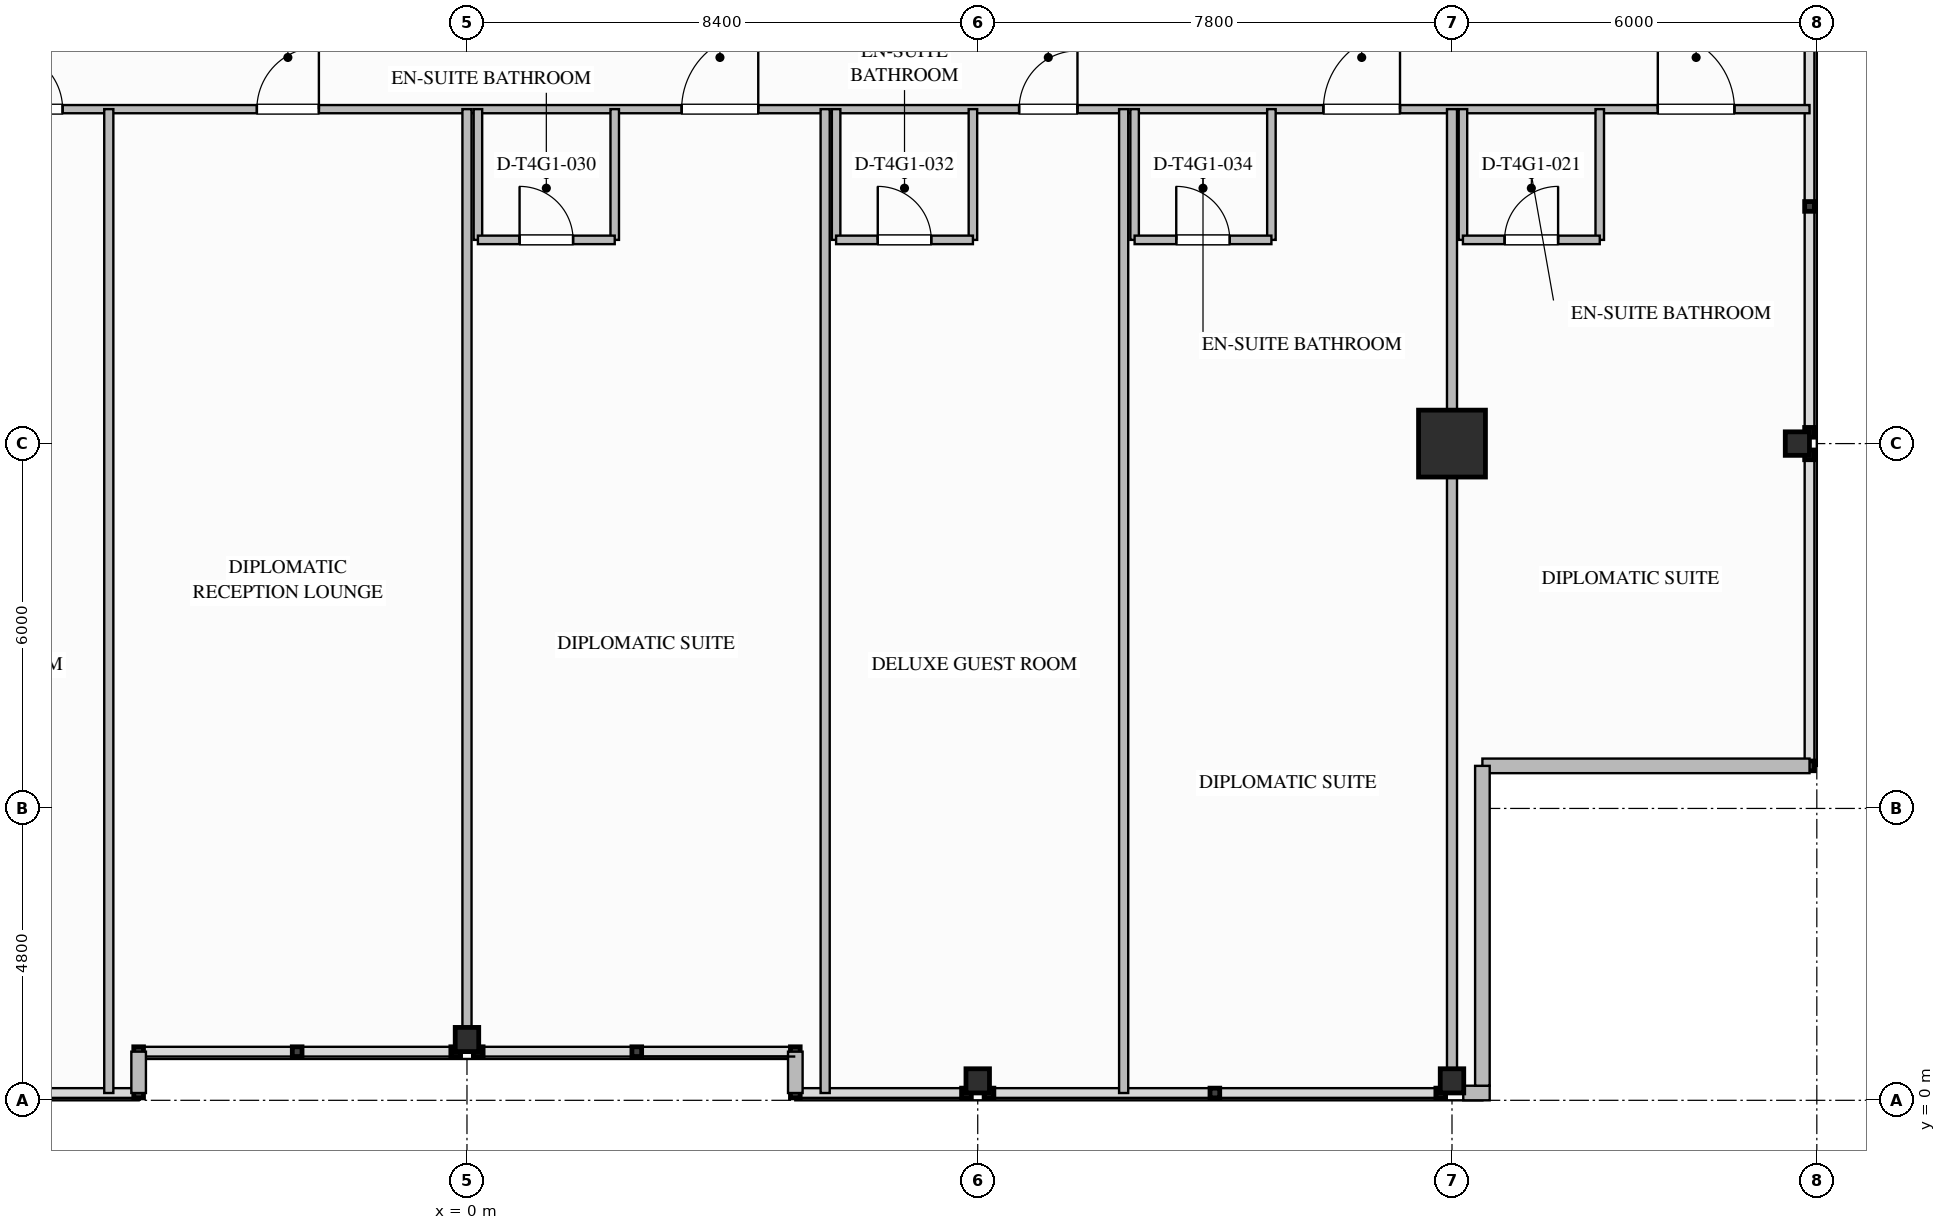
"""IFC4 building model, lengths in metres.
Left out: names, types, materials, properties, quantities, classifications, styles, units other than length and angle.
Written with IfcOpenShell. Run it as: python <this file> out.ifc"""

import sys

from ifc_helpers import new_model, si_unit, direction, frame, frame_2d, origin, origin_2d, place, context, subcontext, project, spatial, rectangle, i_section, extrude, element, fill, save


model = new_model("IFC4")
c1 = context("Model", 3, precision=1e-05, world=origin(), true_north=direction((0.0, 1.0)))
c2 = subcontext(c1, "Body", "Model", "MODEL_VIEW")
j1 = project(units=[si_unit("LENGTHUNIT", "METRE"), si_unit("PLANEANGLEUNIT", "RADIAN")], contexts=[c1])
p1 = place(None, origin())
s1 = spatial("IfcSite", under=j1, at=p1, CompositionType="ELEMENT")
p2 = place(p1, origin())
s2 = spatial("IfcBuilding", under=s1, at=p2, CompositionType="ELEMENT")
p3 = place(p2, frame((0.0, 0.0, 205.1)))
s3 = spatial("IfcBuildingStorey", under=s2, at=p3, CompositionType="ELEMENT", Elevation=205.1)
p4 = place(p3, frame((16.2, 10.8, 0.0), z_axis=(0.0, 0.0, 1.0), x_axis=(1.0, 0.0, 0.0)))
e1 = element("IfcColumn", 1, at=p4, inside=s3, PredefinedType="COLUMN", context=c2, shape_type="SweptSolid", body=[
    extrude(rectangle(XDim=1.1, YDim=1.1, at=origin_2d()), origin(), (0.0, 0.0, 1.0), 3.6),
])
for number, where, z_axis, x_axis in (
    (2, (21.88, 10.8, 0.0), (0.0, 0.0, 1.0), (1.0, 0.0, 0.0)),
    (3, (0.0, 1.0, 0.0), (0.0, 0.0, 1.0), (0.0, 1.0, 0.0)),
    (4, (8.4, 0.32, 0.0), (0.0, 0.0, 1.0), (0.0, 1.0, 0.0)),
    (5, (16.2, 0.32, 0.0), (0.0, 0.0, 1.0), (0.0, 1.0, 0.0)),
):
    element("IfcColumn", number, at=place(p3, frame(where, z_axis=z_axis, x_axis=x_axis)), inside=s3, PredefinedType="COLUMN", context=c2, shape_type="SweptSolid", body=[
        extrude(i_section(OverallWidth=0.397, OverallDepth=0.387, WebThickness=0.021, FlangeThickness=0.033, FilletRadius=0.025, at=origin_2d()), origin(), (0.0, 0.0, 1.0), 3.597),
    ])
p5 = place(p3, frame((16.82, 0.12, 0.0), z_axis=(0.0, 0.0, 1.0), x_axis=(-1.0, 0.0, 0.0)))
e6 = element("IfcWall", 6, at=p5, inside=s3, PredefinedType="STANDARD", context=c2, shape_type="SweptSolid", body=[
    extrude(rectangle(XDim=0.435, YDim=0.24, at=frame_2d((0.217, 0.0))), origin(), (0.0, 0.0, 1.0), 3.34),
])
p6 = place(p3, frame((22.08, 5.5, 0.0), z_axis=(0.0, 0.0, 1.0), x_axis=(-1.0, 0.0, 0.0)))
e7 = element("IfcWall", 7, at=p6, inside=s3, PredefinedType="STANDARD", context=c2, shape_type="SweptSolid", body=[
    extrude(rectangle(XDim=5.38, YDim=0.24, at=frame_2d((2.69, 0.0))), origin(), (0.0, 0.0, 1.0), 3.34),
])
p7 = place(p3, frame((16.7, 5.5, 0.0), z_axis=(0.0, 0.0, 1.0), x_axis=(0.0, -1.0, 0.0)))
e8 = element("IfcWall", 8, at=p7, inside=s3, PredefinedType="STANDARD", context=c2, shape_type="SweptSolid", body=[
    extrude(rectangle(XDim=5.26, YDim=0.24, at=frame_2d((2.63, 0.0))), origin(), (0.0, 0.0, 1.0), 3.34),
])
for number, where, z_axis, x_axis in (
    (9, (5.4, 0.12, 0.0), (0.0, 0.0, 1.0), (0.0, 1.0, 0.0)),
    (10, (-5.4, 0.8, 0.0), (0.0, 0.0, 1.0), (0.0, -1.0, 0.0)),
):
    element("IfcWall", number, at=place(p3, frame(where, z_axis=z_axis, x_axis=x_axis)), inside=s3, PredefinedType="STANDARD", context=c2, shape_type="SweptSolid", body=[
        extrude(rectangle(XDim=0.68, YDim=0.24, at=frame_2d((0.34, 0.0))), origin(), (0.0, 0.0, 1.0), 3.34),
    ])
p8 = place(p3, frame((-16.2, 16.3, 0.0), z_axis=(0.0, 0.0, 1.0), x_axis=(1.0, 0.0, 0.0)))
e11 = element("IfcWall", 11, at=p8, inside=s3, PredefinedType="PARTITIONING", context=c2, shape_type="SweptSolid", body=[
    extrude(rectangle(XDim=38.28, YDim=0.135, at=frame_2d((19.14, 0.0))), origin(), (0.0, 0.0, 1.0), 3.34),
])
p9 = place(p8, frame((35.785, 0.0, 0.0)))
e12 = element("IfcOpeningElement", 12, at=p9, cuts=e11, PredefinedType="OPENING", context=c2, shape_type="SweptSolid", body=[
    extrude(rectangle(XDim=1.26, YDim=2.2, at=frame_2d((0.63, 1.1))), frame((0.0, 0.077, 0.0), z_axis=(0.0, -1.0, 0.0), x_axis=(1.0, 0.0, 0.0)), (0.0, 0.0, 1.0), 0.155),
])
p10 = place(p8, frame((3.285, 0.0, 0.0)))
e13 = element("IfcOpeningElement", 13, at=p10, cuts=e11, PredefinedType="OPENING", context=c2, shape_type="SweptSolid", body=[
    extrude(rectangle(XDim=1.26, YDim=2.2, at=frame_2d((0.63, 1.1))), frame((0.0, 0.077, 0.0), z_axis=(0.0, -1.0, 0.0), x_axis=(1.0, 0.0, 0.0)), (0.0, 0.0, 1.0), 0.155),
])
p11 = place(p8, frame((8.59, 0.0, 0.0)))
e14 = element("IfcOpeningElement", 14, at=p11, cuts=e11, PredefinedType="OPENING", context=c2, shape_type="SweptSolid", body=[
    extrude(rectangle(XDim=0.96, YDim=2.15, at=frame_2d((0.48, 1.075))), frame((0.0, 0.077, 0.0), z_axis=(0.0, -1.0, 0.0), x_axis=(1.0, 0.0, 0.0)), (0.0, 0.0, 1.0), 0.155),
])
p12 = place(p8, frame((12.744, 0.0, 0.0)))
e15 = element("IfcOpeningElement", 15, at=p12, cuts=e11, PredefinedType="OPENING", context=c2, shape_type="SweptSolid", body=[
    extrude(rectangle(XDim=1.02, YDim=2.15, at=frame_2d((0.51, 1.075))), frame((0.0, 0.077, 0.0), z_axis=(0.0, -1.0, 0.0), x_axis=(1.0, 0.0, 0.0)), (0.0, 0.0, 1.0), 0.155),
])
p13 = place(p8, frame((19.73, 0.0, 0.0)))
e16 = element("IfcOpeningElement", 16, at=p13, cuts=e11, PredefinedType="OPENING", context=c2, shape_type="SweptSolid", body=[
    extrude(rectangle(XDim=1.26, YDim=2.2, at=frame_2d((0.63, 1.1))), frame((0.0, 0.077, 0.0), z_axis=(0.0, -1.0, 0.0), x_axis=(1.0, 0.0, 0.0)), (0.0, 0.0, 1.0), 0.155),
])
p14 = place(p8, frame((25.281, 0.0, 0.0)))
e17 = element("IfcOpeningElement", 17, at=p14, cuts=e11, PredefinedType="OPENING", context=c2, shape_type="SweptSolid", body=[
    extrude(rectangle(XDim=0.96, YDim=2.15, at=frame_2d((0.48, 1.075))), frame((0.0, 0.077, 0.0), z_axis=(0.0, -1.0, 0.0), x_axis=(1.0, 0.0, 0.0)), (0.0, 0.0, 1.0), 0.155),
])
p15 = place(p8, frame((30.285, 0.0, 0.0)))
e18 = element("IfcOpeningElement", 18, at=p15, cuts=e11, PredefinedType="OPENING", context=c2, shape_type="SweptSolid", body=[
    extrude(rectangle(XDim=1.26, YDim=2.2, at=frame_2d((0.63, 1.1))), frame((0.0, 0.077, 0.0), z_axis=(0.0, -1.0, 0.0), x_axis=(1.0, 0.0, 0.0)), (0.0, 0.0, 1.0), 0.155),
])
p16 = place(p3, frame((16.2, 0.12, 0.0), z_axis=(0.0, 0.0, 1.0), x_axis=(0.0, 1.0, 0.0)))
e19 = element("IfcWall", 19, at=p16, inside=s3, PredefinedType="PARTITIONING", context=c2, shape_type="SweptSolid", body=[
    extrude(rectangle(XDim=16.18, YDim=0.165, at=frame_2d((8.09, 0.0))), origin(), (0.0, 0.0, 1.0), 2.714),
])
p17 = place(p3, frame((16.38, 16.3, 0.0), z_axis=(0.0, 0.0, 1.0), x_axis=(0.0, -1.0, 0.0)))
e20 = element("IfcWall", 20, at=p17, inside=s3, PredefinedType="PLUMBINGWALL", context=c2, shape_type="SweptSolid", body=[
    extrude(rectangle(XDim=2.15, YDim=0.14, at=frame_2d((1.075, 0.0))), origin(), (0.0, 0.0, 1.0), 2.714),
])
p18 = place(p3, frame((18.63, 16.3, 0.0), z_axis=(0.0, 0.0, 1.0), x_axis=(0.0, -1.0, 0.0)))
e21 = element("IfcWall", 21, at=p18, inside=s3, PredefinedType="PLUMBINGWALL", context=c2, shape_type="SweptSolid", body=[
    extrude(rectangle(XDim=2.15, YDim=0.14, at=frame_2d((1.075, 0.0))), origin(), (0.0, 0.0, 1.0), 3.34),
])
p19 = place(p3, frame((16.38, 14.15, 0.0), z_axis=(0.0, 0.0, 1.0), x_axis=(1.0, 0.0, 0.0)))
e22 = element("IfcWall", 22, at=p19, inside=s3, PredefinedType="PLUMBINGWALL", context=c2, shape_type="SweptSolid", body=[
    extrude(rectangle(XDim=2.25, YDim=0.14, at=frame_2d((1.125, 0.0))), origin(), (0.0, 0.0, 1.0), 3.34),
])
p20 = place(p19, frame((0.685, 0.0, 0.0)))
e23 = element("IfcOpeningElement", 23, at=p20, cuts=e22, PredefinedType="OPENING", context=c2, shape_type="SweptSolid", body=[
    extrude(rectangle(XDim=0.88, YDim=2.1, at=frame_2d((0.44, 1.05))), frame((0.0, 0.08, 0.0), z_axis=(0.0, -1.0, 0.0), x_axis=(1.0, 0.0, 0.0)), (0.0, 0.0, 1.0), 0.16),
])
p21 = place(p3, frame((-5.891, 0.12, 0.0), z_axis=(0.0, 0.0, 1.0), x_axis=(0.0, 1.0, 0.0)))
e24 = element("IfcWall", 24, at=p21, inside=s3, PredefinedType="PARTITIONING", context=c2, shape_type="SweptSolid", body=[
    extrude(rectangle(XDim=16.18, YDim=0.15, at=frame_2d((8.09, 0.0))), origin(), (0.0, 0.0, 1.0), 3.34),
])
p22 = place(p3, frame((0.0, 0.8, 0.0), z_axis=(0.0, 0.0, 1.0), x_axis=(0.0, 1.0, 0.0)))
e25 = element("IfcWall", 25, at=p22, inside=s3, PredefinedType="PARTITIONING", context=c2, shape_type="SweptSolid", body=[
    extrude(rectangle(XDim=15.5, YDim=0.15, at=frame_2d((7.75, 0.0))), origin(), (0.0, 0.0, 1.0), 2.714),
])
p23 = place(p3, frame((0.18, 16.3, 0.0), z_axis=(0.0, 0.0, 1.0), x_axis=(0.0, -1.0, 0.0)))
e26 = element("IfcWall", 26, at=p23, inside=s3, PredefinedType="PLUMBINGWALL", context=c2, shape_type="SweptSolid", body=[
    extrude(rectangle(XDim=2.15, YDim=0.14, at=frame_2d((1.075, 0.0))), origin(), (0.0, 0.0, 1.0), 2.717),
])
p24 = place(p3, frame((2.43, 16.3, 0.0), z_axis=(0.0, 0.0, 1.0), x_axis=(0.0, -1.0, 0.0)))
e27 = element("IfcWall", 27, at=p24, inside=s3, PredefinedType="PLUMBINGWALL", context=c2, shape_type="SweptSolid", body=[
    extrude(rectangle(XDim=2.15, YDim=0.14, at=frame_2d((1.075, 0.0))), origin(), (0.0, 0.0, 1.0), 3.34),
])
p25 = place(p3, frame((0.18, 14.15, 0.0), z_axis=(0.0, 0.0, 1.0), x_axis=(1.0, 0.0, 0.0)))
e28 = element("IfcWall", 28, at=p25, inside=s3, PredefinedType="PLUMBINGWALL", context=c2, shape_type="SweptSolid", body=[
    extrude(rectangle(XDim=2.25, YDim=0.14, at=frame_2d((1.125, 0.0))), origin(), (0.0, 0.0, 1.0), 3.34),
])
p26 = place(p25, frame((0.685, 0.0, 0.0)))
e29 = element("IfcOpeningElement", 29, at=p26, cuts=e28, PredefinedType="OPENING", context=c2, shape_type="SweptSolid", body=[
    extrude(rectangle(XDim=0.88, YDim=2.1, at=frame_2d((0.44, 1.05))), frame((0.0, 0.08, 0.0), z_axis=(0.0, -1.0, 0.0), x_axis=(1.0, 0.0, 0.0)), (0.0, 0.0, 1.0), 0.16),
])
p27 = place(p3, frame((5.891, 0.12, 0.0), z_axis=(0.0, 0.0, 1.0), x_axis=(0.0, 1.0, 0.0)))
e30 = element("IfcWall", 30, at=p27, inside=s3, PredefinedType="PARTITIONING", context=c2, shape_type="SweptSolid", body=[
    extrude(rectangle(XDim=16.18, YDim=0.15, at=frame_2d((8.09, 0.0))), origin(), (0.0, 0.0, 1.0), 3.34),
])
p28 = place(p3, frame((6.071, 16.3, 0.0), z_axis=(0.0, 0.0, 1.0), x_axis=(0.0, -1.0, 0.0)))
e31 = element("IfcWall", 31, at=p28, inside=s3, PredefinedType="PLUMBINGWALL", context=c2, shape_type="SweptSolid", body=[
    extrude(rectangle(XDim=2.15, YDim=0.14, at=frame_2d((1.075, 0.0))), origin(), (0.0, 0.0, 1.0), 3.34),
])
p29 = place(p3, frame((8.321, 16.3, 0.0), z_axis=(0.0, 0.0, 1.0), x_axis=(0.0, -1.0, 0.0)))
e32 = element("IfcWall", 32, at=p29, inside=s3, PredefinedType="PLUMBINGWALL", context=c2, shape_type="SweptSolid", body=[
    extrude(rectangle(XDim=2.15, YDim=0.14, at=frame_2d((1.075, 0.0))), origin(), (0.0, 0.0, 1.0), 2.717),
])
p30 = place(p3, frame((6.071, 14.15, 0.0), z_axis=(0.0, 0.0, 1.0), x_axis=(1.0, 0.0, 0.0)))
e33 = element("IfcWall", 33, at=p30, inside=s3, PredefinedType="PLUMBINGWALL", context=c2, shape_type="SweptSolid", body=[
    extrude(rectangle(XDim=2.25, YDim=0.14, at=frame_2d((1.125, 0.0))), origin(), (0.0, 0.0, 1.0), 3.34),
])
p31 = place(p30, frame((0.685, 0.0, 0.0)))
e34 = element("IfcOpeningElement", 34, at=p31, cuts=e33, PredefinedType="OPENING", context=c2, shape_type="SweptSolid", body=[
    extrude(rectangle(XDim=0.88, YDim=2.1, at=frame_2d((0.44, 1.05))), frame((0.0, 0.08, 0.0), z_axis=(0.0, -1.0, 0.0), x_axis=(1.0, 0.0, 0.0)), (0.0, 0.0, 1.0), 0.16),
])
p32 = place(p3, frame((10.8, 0.12, 0.0), z_axis=(0.0, 0.0, 1.0), x_axis=(0.0, 1.0, 0.0)))
e35 = element("IfcWall", 35, at=p32, inside=s3, PredefinedType="PARTITIONING", context=c2, shape_type="SweptSolid", body=[
    extrude(rectangle(XDim=16.18, YDim=0.15, at=frame_2d((8.09, 0.0))), origin(), (0.0, 0.0, 1.0), 3.34),
])
for number, where, z_axis, x_axis in (
    (36, (10.98, 16.3, 0.0), (0.0, 0.0, 1.0), (0.0, -1.0, 0.0)),
    (37, (13.23, 16.3, 0.0), (0.0, 0.0, 1.0), (0.0, -1.0, 0.0)),
):
    element("IfcWall", number, at=place(p3, frame(where, z_axis=z_axis, x_axis=x_axis)), inside=s3, PredefinedType="PLUMBINGWALL", context=c2, shape_type="SweptSolid", body=[
        extrude(rectangle(XDim=2.15, YDim=0.14, at=frame_2d((1.075, 0.0))), origin(), (0.0, 0.0, 1.0), 3.34),
    ])
p33 = place(p3, frame((10.98, 14.15, 0.0), z_axis=(0.0, 0.0, 1.0), x_axis=(1.0, 0.0, 0.0)))
e38 = element("IfcWall", 38, at=p33, inside=s3, PredefinedType="PLUMBINGWALL", context=c2, shape_type="SweptSolid", body=[
    extrude(rectangle(XDim=2.25, YDim=0.14, at=frame_2d((1.125, 0.0))), origin(), (0.0, 0.0, 1.0), 3.34),
])
p34 = place(p33, frame((0.685, 0.0, 0.0)))
e39 = element("IfcOpeningElement", 39, at=p34, cuts=e38, PredefinedType="OPENING", context=c2, shape_type="SweptSolid", body=[
    extrude(rectangle(XDim=0.88, YDim=2.1, at=frame_2d((0.44, 1.05))), frame((0.0, 0.08, 0.0), z_axis=(0.0, -1.0, 0.0), x_axis=(1.0, 0.0, 0.0)), (0.0, 0.0, 1.0), 0.16),
])
p35 = place(p20, origin())
e40 = element("IfcDoor", 40, at=p35, inside=s3, OperationType="SINGLE_SWING_RIGHT", PredefinedType="DOOR", context=c2, shape_type="SweptSolid", body=[
    extrude(rectangle(XDim=0.88, YDim=2.1, at=frame_2d((0.44, 1.05))), frame((0.0, 0.025, 0.0), z_axis=(0.0, -1.0, 0.0), x_axis=(1.0, 0.0, 0.0)), (0.0, 0.0, 1.0), 0.05),
])
fill(e23, e40)
p36 = place(p9, origin())
e41 = element("IfcDoor", 41, at=p36, inside=s3, OperationType="SINGLE_SWING_LEFT", PredefinedType="DOOR", context=c2, shape_type="SweptSolid", body=[
    extrude(rectangle(XDim=1.26, YDim=2.2, at=frame_2d((0.63, 1.1))), frame((0.0, 0.025, 0.0), z_axis=(0.0, -1.0, 0.0), x_axis=(1.0, 0.0, 0.0)), (0.0, 0.0, 1.0), 0.05),
])
fill(e12, e41)
p37 = place(p11, origin())
e42 = element("IfcDoor", 42, at=p37, inside=s3, OperationType="SINGLE_SWING_LEFT", PredefinedType="DOOR", context=c2, shape_type="SweptSolid", body=[
    extrude(rectangle(XDim=0.96, YDim=2.15, at=frame_2d((0.48, 1.075))), frame((0.0, 0.025, 0.0), z_axis=(0.0, -1.0, 0.0), x_axis=(1.0, 0.0, 0.0)), (0.0, 0.0, 1.0), 0.05),
])
fill(e14, e42)
p38 = place(p12, origin())
e43 = element("IfcDoor", 43, at=p38, inside=s3, OperationType="SINGLE_SWING_RIGHT", PredefinedType="DOOR", context=c2, shape_type="SweptSolid", body=[
    extrude(rectangle(XDim=1.02, YDim=2.15, at=frame_2d((0.51, 1.075))), frame((0.0, 0.025, 0.0), z_axis=(0.0, -1.0, 0.0), x_axis=(1.0, 0.0, 0.0)), (0.0, 0.0, 1.0), 0.05),
])
fill(e15, e43)
p39 = place(p26, origin())
e44 = element("IfcDoor", 44, at=p39, inside=s3, OperationType="SINGLE_SWING_LEFT", PredefinedType="DOOR", context=c2, shape_type="SweptSolid", body=[
    extrude(rectangle(XDim=0.88, YDim=2.1, at=frame_2d((0.44, 1.05))), frame((0.0, 0.025, 0.0), z_axis=(0.0, -1.0, 0.0), x_axis=(1.0, 0.0, 0.0)), (0.0, 0.0, 1.0), 0.05),
])
fill(e29, e44)
p40 = place(p13, origin())
e45 = element("IfcDoor", 45, at=p40, inside=s3, OperationType="SINGLE_SWING_RIGHT", PredefinedType="DOOR", context=c2, shape_type="SweptSolid", body=[
    extrude(rectangle(XDim=1.26, YDim=2.2, at=frame_2d((0.63, 1.1))), frame((0.0, 0.025, 0.0), z_axis=(0.0, -1.0, 0.0), x_axis=(1.0, 0.0, 0.0)), (0.0, 0.0, 1.0), 0.05),
])
fill(e16, e45)
p41 = place(p31, origin())
e46 = element("IfcDoor", 46, at=p41, inside=s3, OperationType="SINGLE_SWING_LEFT", PredefinedType="DOOR", context=c2, shape_type="SweptSolid", body=[
    extrude(rectangle(XDim=0.88, YDim=2.1, at=frame_2d((0.44, 1.05))), frame((0.0, 0.025, 0.0), z_axis=(0.0, -1.0, 0.0), x_axis=(1.0, 0.0, 0.0)), (0.0, 0.0, 1.0), 0.05),
])
fill(e34, e46)
p42 = place(p14, origin())
e47 = element("IfcDoor", 47, at=p42, inside=s3, OperationType="SINGLE_SWING_RIGHT", PredefinedType="DOOR", context=c2, shape_type="SweptSolid", body=[
    extrude(rectangle(XDim=0.96, YDim=2.15, at=frame_2d((0.48, 1.075))), frame((0.0, 0.025, 0.0), z_axis=(0.0, -1.0, 0.0), x_axis=(1.0, 0.0, 0.0)), (0.0, 0.0, 1.0), 0.05),
])
fill(e17, e47)
p43 = place(p34, origin())
e48 = element("IfcDoor", 48, at=p43, inside=s3, OperationType="SINGLE_SWING_LEFT", PredefinedType="DOOR", context=c2, shape_type="SweptSolid", body=[
    extrude(rectangle(XDim=0.88, YDim=2.1, at=frame_2d((0.44, 1.05))), frame((0.0, 0.025, 0.0), z_axis=(0.0, -1.0, 0.0), x_axis=(1.0, 0.0, 0.0)), (0.0, 0.0, 1.0), 0.05),
])
fill(e39, e48)
p44 = place(p15, origin())
e49 = element("IfcDoor", 49, at=p44, inside=s3, OperationType="SINGLE_SWING_RIGHT", PredefinedType="DOOR", context=c2, shape_type="SweptSolid", body=[
    extrude(rectangle(XDim=1.26, YDim=2.2, at=frame_2d((0.63, 1.1))), frame((0.0, 0.025, 0.0), z_axis=(0.0, -1.0, 0.0), x_axis=(1.0, 0.0, 0.0)), (0.0, 0.0, 1.0), 0.05),
])
fill(e18, e49)
save(model, sys.argv[1])
